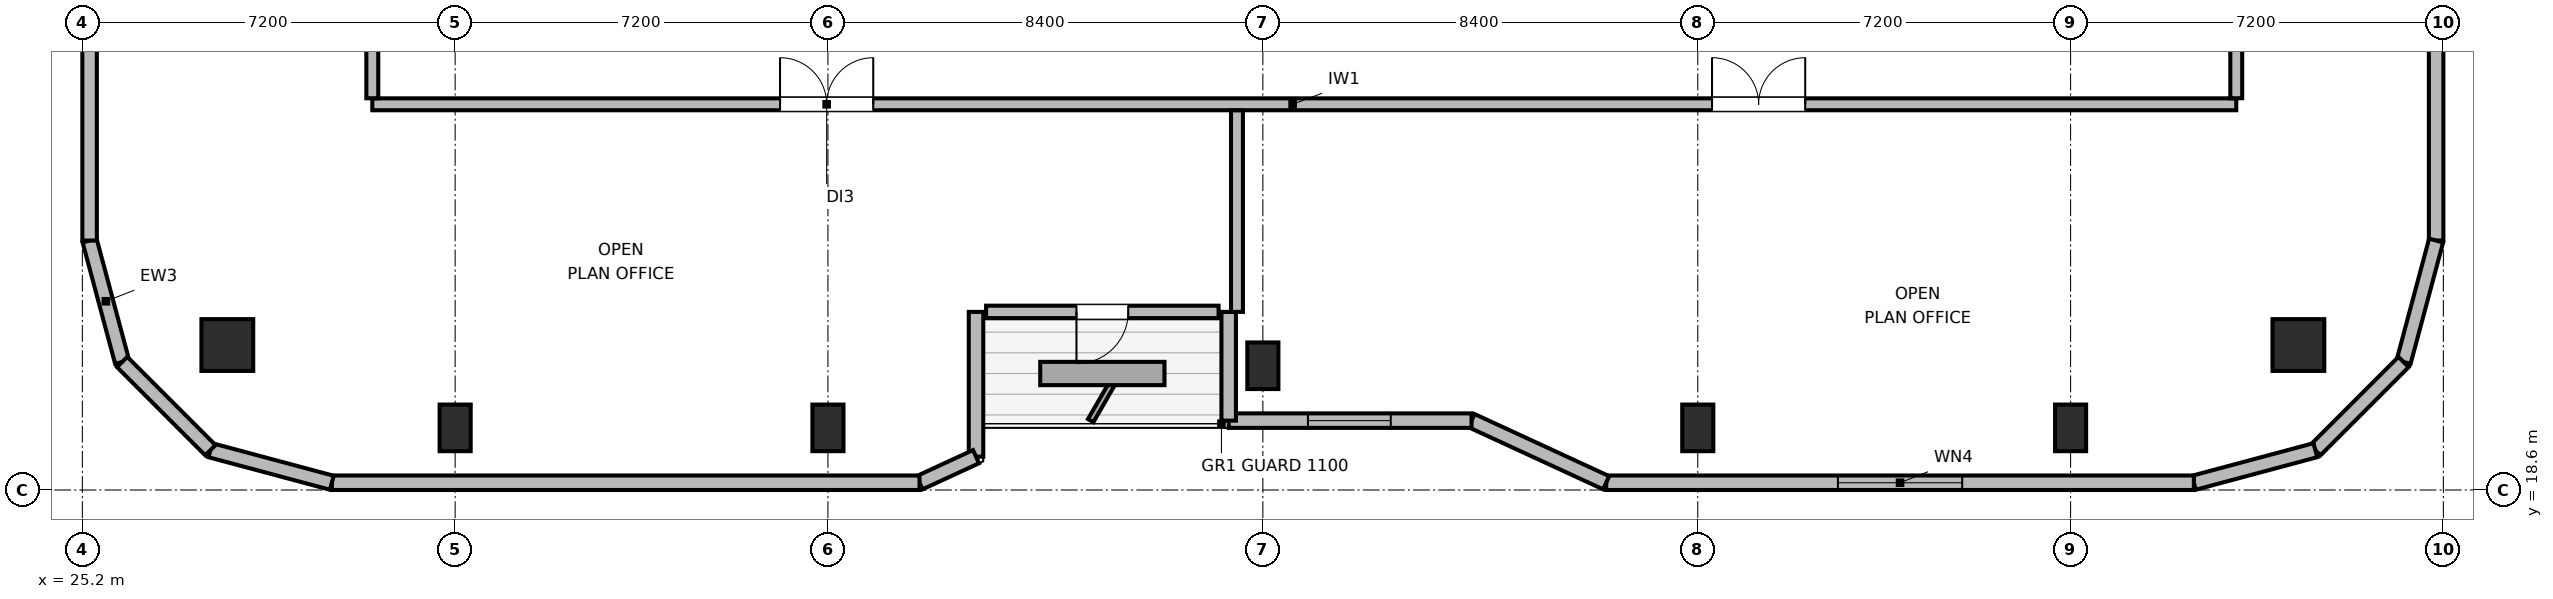
"""IFC4 building model, lengths in metres.
Left out: names, types, materials, properties, quantities, classifications, styles, units other than length and angle.
Written with IfcOpenShell. Run it as: python <this file> out.ifc"""

import sys

from ifc_helpers import new_model, si_unit, direction, frame, frame_2d, origin, origin_2d, place, context, subcontext, project, spatial, rectangle, circle, extrude, element, fill, save


model = new_model("IFC4")
c1 = context("Model", 3, precision=1e-05, world=origin(), true_north=direction((0.0, 1.0)))
c2 = subcontext(c1, "Body", "Model", "MODEL_VIEW")
j1 = project(units=[si_unit("LENGTHUNIT", "METRE"), si_unit("PLANEANGLEUNIT", "RADIAN")], contexts=[c1])
p1 = place(None, origin())
s1 = spatial("IfcSite", under=j1, at=p1, CompositionType="ELEMENT")
p2 = place(p1, origin())
s2 = spatial("IfcBuilding", under=s1, at=p2, CompositionType="ELEMENT")
p3 = place(p2, frame((0.0, 0.0, 255.0)))
s3 = spatial("IfcBuildingStorey", under=s2, at=p3, CompositionType="ELEMENT", Elevation=255.0)
for number, where, z_axis, x_axis in (
    (1, (28.0, 21.4, 0.0), (0.0, 0.0, 1.0), (1.0, 0.0, 0.0)),
    (2, (68.0, 21.4, 0.0), (0.0, 0.0, 1.0), (1.0, 0.0, 0.0)),
):
    element("IfcColumn", number, at=place(p3, frame(where, z_axis=z_axis, x_axis=x_axis)), inside=s3, PredefinedType="COLUMN", context=c2, shape_type="SweptSolid", body=[
        extrude(circle(Radius=0.5, at=origin_2d()), origin(), (0.0, 0.0, 1.0), 3.9),
    ])
for number, where, z_axis, x_axis in (
    (3, (32.4, 19.8, 0.0), (0.0, 0.0, 1.0), (1.0, 0.0, 0.0)),
    (4, (39.6, 19.8, 0.0), (0.0, 0.0, 1.0), (1.0, 0.0, 0.0)),
    (5, (48.0, 21.0, 0.0), (0.0, 0.0, 1.0), (1.0, 0.0, 0.0)),
    (6, (56.4, 19.8, 0.0), (0.0, 0.0, 1.0), (1.0, 0.0, 0.0)),
    (7, (63.6, 19.8, 0.0), (0.0, 0.0, 1.0), (1.0, 0.0, 0.0)),
):
    element("IfcColumn", number, at=place(p3, frame(where, z_axis=z_axis, x_axis=x_axis)), inside=s3, PredefinedType="COLUMN", context=c2, shape_type="SweptSolid", body=[
        extrude(rectangle(XDim=0.6, YDim=0.9, at=origin_2d()), origin(), (0.0, 0.0, 1.0), 3.9),
    ])
p4 = place(p3, frame((25.969, 21.073, 0.0), z_axis=(0.0, 0.0, 1.0), x_axis=(-0.258751159445, 0.965944013639, 0.0)))
e8 = element("IfcWall", 8, at=p4, inside=s3, PredefinedType="SOLIDWALL", context=c2, shape_type="SweptSolid", body=[
    extrude(rectangle(XDim=2.429, YDim=0.28, at=frame_2d((1.214, 0.0))), origin(), (0.0, 0.0, 1.0), 3.68),
])
p5 = place(p3, frame((25.34, 23.418, 0.0), z_axis=(0.0, 0.0, 1.0), x_axis=(0.0, 1.0, 0.0)))
e9 = element("IfcWall", 9, at=p5, inside=s3, PredefinedType="SOLIDWALL", context=c2, shape_type="SweptSolid", body=[
    extrude(rectangle(XDim=5.842, YDim=0.28, at=frame_2d((2.921, 0.0))), origin(), (0.0, 0.0, 1.0), 3.68),
])
p6 = place(p3, frame((70.66, 37.66, 0.0), z_axis=(0.0, 0.0, 1.0), x_axis=(0.0, -1.0, 0.0)))
e10 = element("IfcWall", 10, at=p6, inside=s3, PredefinedType="SOLIDWALL", context=c2, shape_type="SweptSolid", body=[
    extrude(rectangle(XDim=14.241, YDim=0.28, at=frame_2d((7.121, 0.0))), origin(), (0.0, 0.0, 1.0), 3.68),
])
p7 = place(p6, frame((6.456, 0.0, 0.85)))
e11 = element("IfcOpeningElement", 11, at=p7, cuts=e10, PredefinedType="OPENING", context=c2, shape_type="SweptSolid", body=[
    extrude(rectangle(XDim=1.6, YDim=1.0, at=frame_2d((0.8, 0.5))), frame((0.0, 0.15, 0.0), z_axis=(0.0, -1.0, 0.0), x_axis=(1.0, 0.0, 0.0)), (0.0, 0.0, 1.0), 0.3),
])
p8 = place(p3, frame((70.66, 23.418, 0.0), z_axis=(0.0, 0.0, 1.0), x_axis=(-0.258751159445, -0.965944013639, 0.0)))
e12 = element("IfcWall", 12, at=p8, inside=s3, PredefinedType="SOLIDWALL", context=c2, shape_type="SweptSolid", body=[
    extrude(rectangle(XDim=2.429, YDim=0.28, at=frame_2d((1.214, 0.0))), origin(), (0.0, 0.0, 1.0), 3.68),
])
p9 = place(p3, frame((70.031, 21.073, 0.0), z_axis=(0.0, 0.0, 1.0), x_axis=(-0.707106781187, -0.707106781187, 0.0)))
e13 = element("IfcWall", 13, at=p9, inside=s3, PredefinedType="SOLIDWALL", context=c2, shape_type="SweptSolid", body=[
    extrude(rectangle(XDim=2.41, YDim=0.28, at=frame_2d((1.205, 0.0))), origin(), (0.0, 0.0, 1.0), 3.68),
])
p10 = place(p3, frame((68.327, 19.368, 0.0), z_axis=(0.0, 0.0, 1.0), x_axis=(-0.965937282298, -0.25877628691, 0.0)))
e14 = element("IfcWall", 14, at=p10, inside=s3, PredefinedType="SOLIDWALL", context=c2, shape_type="SweptSolid", body=[
    extrude(rectangle(XDim=2.428, YDim=0.28, at=frame_2d((1.214, 0.0))), origin(), (0.0, 0.0, 1.0), 3.68),
])
p11 = place(p3, frame((65.982, 18.74, 0.0), z_axis=(0.0, 0.0, 1.0), x_axis=(-1.0, 0.0, 0.0)))
e15 = element("IfcWall", 15, at=p11, inside=s3, PredefinedType="SOLIDWALL", context=c2, shape_type="SweptSolid", body=[
    extrude(rectangle(XDim=11.351, YDim=0.28, at=frame_2d((5.676, 0.0))), origin(), (0.0, 0.0, 1.0), 3.68),
])
p12 = place(p11, frame((4.475, 0.0, 0.85)))
e16 = element("IfcOpeningElement", 16, at=p12, cuts=e15, PredefinedType="OPENING", context=c2, shape_type="SweptSolid", body=[
    extrude(rectangle(XDim=2.4, YDim=1.15, at=frame_2d((1.2, 0.575))), frame((0.0, 0.15, 0.0), z_axis=(0.0, -1.0, 0.0), x_axis=(1.0, 0.0, 0.0)), (0.0, 0.0, 1.0), 0.3),
])
p13 = place(p3, frame((54.631, 18.74, 0.0), z_axis=(0.0, 0.0, 1.0), x_axis=(-0.907956889006, 0.419063584324, 0.0)))
e17 = element("IfcWall", 17, at=p13, inside=s3, PredefinedType="SOLIDWALL", context=c2, shape_type="SweptSolid", body=[
    extrude(rectangle(XDim=2.864, YDim=0.28, at=frame_2d((1.432, 0.0))), origin(), (0.0, 0.0, 1.0), 2.265),
])
p14 = place(p3, frame((52.031, 19.94, 0.0), z_axis=(0.0, 0.0, 1.0), x_axis=(-1.0, 0.0, 0.0)))
e18 = element("IfcWall", 18, at=p14, inside=s3, PredefinedType="SOLIDWALL", context=c2, shape_type="SweptSolid", body=[
    extrude(rectangle(XDim=4.691, YDim=0.28, at=frame_2d((2.345, 0.0))), origin(), (0.0, 0.0, 1.0), 2.265),
])
p15 = place(p14, frame((1.56, 0.0, 0.85)))
e19 = element("IfcOpeningElement", 19, at=p15, cuts=e18, PredefinedType="OPENING", context=c2, shape_type="SweptSolid", body=[
    extrude(rectangle(XDim=1.6, YDim=1.0, at=frame_2d((0.8, 0.5))), frame((0.0, 0.15, 0.0), z_axis=(0.0, -1.0, 0.0), x_axis=(1.0, 0.0, 0.0)), (0.0, 0.0, 1.0), 0.3),
])
p16 = place(p3, frame((47.34, 19.94, 0.0), z_axis=(0.0, 0.0, 1.0), x_axis=(0.0, 1.0, 0.0)))
e20 = element("IfcWall", 20, at=p16, inside=s3, PredefinedType="SOLIDWALL", context=c2, shape_type="SweptSolid", body=[
    extrude(rectangle(XDim=2.1, YDim=0.28, at=frame_2d((1.05, 0.0))), origin(), (0.0, 0.0, 1.0), 2.265),
])
p17 = place(p3, frame((47.145, 22.04, 0.0), z_axis=(0.0, 0.0, 1.0), x_axis=(-1.0, 0.0, 0.0)))
e21 = element("IfcWall", 21, at=p17, inside=s3, PredefinedType="SOLIDWALL", context=c2, shape_type="SweptSolid", body=[
    extrude(rectangle(XDim=4.49, YDim=0.24, at=frame_2d((2.245, 0.0))), origin(), (0.0, 0.0, 1.0), 3.68),
])
p18 = place(p17, frame((1.745, 0.0, 0.0)))
e22 = element("IfcOpeningElement", 22, at=p18, cuts=e21, PredefinedType="OPENING", context=c2, shape_type="SweptSolid", body=[
    extrude(rectangle(XDim=1.0, YDim=2.02, at=frame_2d((0.5, 1.01))), frame((0.0, 0.13, 0.0), z_axis=(0.0, -1.0, 0.0), x_axis=(1.0, 0.0, 0.0)), (0.0, 0.0, 1.0), 0.26),
])
p19 = place(p3, frame((42.46, 22.04, 0.0), z_axis=(0.0, 0.0, 1.0), x_axis=(0.0, -1.0, 0.0)))
e23 = element("IfcWall", 23, at=p19, inside=s3, PredefinedType="SOLIDWALL", context=c2, shape_type="SweptSolid", body=[
    extrude(rectangle(XDim=2.796, YDim=0.28, at=frame_2d((1.398, 0.0))), origin(), (0.0, 0.0, 1.0), 2.265),
])
p20 = place(p3, frame((42.46, 19.244, 0.0), z_axis=(0.0, 0.0, 1.0), x_axis=(-0.907893953211, -0.419199916176, 0.0)))
e24 = element("IfcWall", 24, at=p20, inside=s3, PredefinedType="SOLIDWALL", context=c2, shape_type="SweptSolid", body=[
    extrude(rectangle(XDim=1.201, YDim=0.28, at=frame_2d((0.601, 0.0))), origin(), (0.0, 0.0, 1.0), 3.68),
])
p21 = place(p3, frame((41.369, 18.74, 0.0), z_axis=(0.0, 0.0, 1.0), x_axis=(-1.0, 0.0, 0.0)))
e25 = element("IfcWall", 25, at=p21, inside=s3, PredefinedType="SOLIDWALL", context=c2, shape_type="SweptSolid", body=[
    extrude(rectangle(XDim=11.351, YDim=0.28, at=frame_2d((5.675, 0.0))), origin(), (0.0, 0.0, 1.0), 3.68),
])
p22 = place(p3, frame((30.018, 18.74, 0.0), z_axis=(0.0, 0.0, 1.0), x_axis=(-0.965937282298, 0.25877628691, 0.0)))
e26 = element("IfcWall", 26, at=p22, inside=s3, PredefinedType="SOLIDWALL", context=c2, shape_type="SweptSolid", body=[
    extrude(rectangle(XDim=2.428, YDim=0.28, at=frame_2d((1.214, 0.0))), origin(), (0.0, 0.0, 1.0), 3.68),
])
p23 = place(p3, frame((27.673, 19.368, 0.0), z_axis=(0.0, 0.0, 1.0), x_axis=(-0.707106781187, 0.707106781187, 0.0)))
e27 = element("IfcWall", 27, at=p23, inside=s3, PredefinedType="SOLIDWALL", context=c2, shape_type="SweptSolid", body=[
    extrude(rectangle(XDim=2.41, YDim=0.28, at=frame_2d((1.205, 0.0))), origin(), (0.0, 0.0, 1.0), 3.68),
])
p24 = place(p3, frame((30.8, 26.05, 0.0), z_axis=(0.0, 0.0, 1.0), x_axis=(1.0, 0.0, 0.0)))
e28 = element("IfcWall", 28, at=p24, inside=s3, PredefinedType="PARTITIONING", context=c2, shape_type="SweptSolid", body=[
    extrude(rectangle(XDim=36.0, YDim=0.23, at=frame_2d((18.0, 0.0))), origin(), (0.0, 0.0, 1.0), 3.68),
])
p25 = place(p24, frame((7.875, 0.0, 0.0)))
e29 = element("IfcOpeningElement", 29, at=p25, cuts=e28, PredefinedType="OPENING", context=c2, shape_type="SweptSolid", body=[
    extrude(rectangle(XDim=1.8, YDim=2.06, at=frame_2d((0.9, 1.03))), frame((0.0, 0.125, 0.0), z_axis=(0.0, -1.0, 0.0), x_axis=(1.0, 0.0, 0.0)), (0.0, 0.0, 1.0), 0.25),
])
p26 = place(p24, frame((25.875, 0.0, 0.0)))
e30 = element("IfcOpeningElement", 30, at=p26, cuts=e28, PredefinedType="OPENING", context=c2, shape_type="SweptSolid", body=[
    extrude(rectangle(XDim=1.8, YDim=2.06, at=frame_2d((0.9, 1.03))), frame((0.0, 0.125, 0.0), z_axis=(0.0, -1.0, 0.0), x_axis=(1.0, 0.0, 0.0)), (0.0, 0.0, 1.0), 0.25),
])
p27 = place(p3, frame((30.8, 26.167, 0.0), z_axis=(0.0, 0.0, 1.0), x_axis=(0.0, 1.0, 0.0)))
e31 = element("IfcWall", 31, at=p27, inside=s3, PredefinedType="PARTITIONING", context=c2, shape_type="SweptSolid", body=[
    extrude(rectangle(XDim=19.666, YDim=0.23, at=frame_2d((9.833, 0.0))), origin(), (0.0, 0.0, 1.0), 3.68),
])
p28 = place(p27, frame((9.358, 0.0, 0.0)))
e32 = element("IfcOpeningElement", 32, at=p28, cuts=e31, PredefinedType="OPENING", context=c2, shape_type="SweptSolid", body=[
    extrude(rectangle(XDim=1.8, YDim=2.06, at=frame_2d((0.9, 1.03))), frame((0.0, 0.125, 0.0), z_axis=(0.0, -1.0, 0.0), x_axis=(1.0, 0.0, 0.0)), (0.0, 0.0, 1.0), 0.25),
])
p29 = place(p3, frame((66.8, 26.167, 0.0), z_axis=(0.0, 0.0, 1.0), x_axis=(0.0, 1.0, 0.0)))
e33 = element("IfcWall", 33, at=p29, inside=s3, PredefinedType="PARTITIONING", context=c2, shape_type="SweptSolid", body=[
    extrude(rectangle(XDim=19.666, YDim=0.23, at=frame_2d((9.833, 0.0))), origin(), (0.0, 0.0, 1.0), 3.68),
])
p30 = place(p29, frame((4.983, 0.0, 0.0)))
e34 = element("IfcOpeningElement", 34, at=p30, cuts=e33, PredefinedType="OPENING", context=c2, shape_type="SweptSolid", body=[
    extrude(rectangle(XDim=1.8, YDim=2.06, at=frame_2d((0.9, 1.03))), frame((0.0, 0.125, 0.0), z_axis=(0.0, -1.0, 0.0), x_axis=(1.0, 0.0, 0.0)), (0.0, 0.0, 1.0), 0.25),
])
p31 = place(p29, frame((14.933, 0.0, 0.0)))
e35 = element("IfcOpeningElement", 35, at=p31, cuts=e33, PredefinedType="OPENING", context=c2, shape_type="SweptSolid", body=[
    extrude(rectangle(XDim=1.8, YDim=2.06, at=frame_2d((0.9, 1.03))), frame((0.0, 0.125, 0.0), z_axis=(0.0, -1.0, 0.0), x_axis=(1.0, 0.0, 0.0)), (0.0, 0.0, 1.0), 0.25),
])
p32 = place(p3, frame((47.5, 22.04, 0.0), z_axis=(0.0, 0.0, 1.0), x_axis=(0.0, 1.0, 0.0)))
e36 = element("IfcWall", 36, at=p32, inside=s3, PredefinedType="PARTITIONING", context=c2, shape_type="SweptSolid", body=[
    extrude(rectangle(XDim=3.893, YDim=0.23, at=frame_2d((1.947, 0.0))), origin(), (0.0, 0.0, 1.0), 3.68),
])
p33 = place(p12, origin())
e37 = element("IfcWindow", 37, at=p33, inside=s3, PartitioningType="SINGLE_PANEL", PredefinedType="WINDOW", context=c2, shape_type="SweptSolid", body=[
    extrude(rectangle(XDim=2.4, YDim=1.15, at=frame_2d((1.2, 0.575))), frame((0.0, 0.03, 0.0), z_axis=(0.0, -1.0, 0.0), x_axis=(1.0, 0.0, 0.0)), (0.0, 0.0, 1.0), 0.06),
])
fill(e16, e37)
p34 = place(p15, origin())
e38 = element("IfcWindow", 38, at=p34, inside=s3, PartitioningType="SINGLE_PANEL", PredefinedType="WINDOW", context=c2, shape_type="SweptSolid", body=[
    extrude(rectangle(XDim=1.6, YDim=1.0, at=frame_2d((0.8, 0.5))), frame((0.0, 0.03, 0.0), z_axis=(0.0, -1.0, 0.0), x_axis=(1.0, 0.0, 0.0)), (0.0, 0.0, 1.0), 0.06),
])
fill(e19, e38)
p35 = place(p18, origin())
e39 = element("IfcDoor", 39, at=p35, inside=s3, OperationType="SINGLE_SWING_RIGHT", PredefinedType="DOOR", context=c2, shape_type="SweptSolid", body=[
    extrude(rectangle(XDim=1.0, YDim=2.02, at=frame_2d((0.5, 1.01))), frame((0.0, 0.025, 0.0), z_axis=(0.0, -1.0, 0.0), x_axis=(1.0, 0.0, 0.0)), (0.0, 0.0, 1.0), 0.05),
])
fill(e22, e39)
p36 = place(p25, origin())
e40 = element("IfcDoor", 40, at=p36, inside=s3, OperationType="DOUBLE_DOOR_SINGLE_SWING", PredefinedType="DOOR", context=c2, shape_type="SweptSolid", body=[
    extrude(rectangle(XDim=1.8, YDim=2.06, at=frame_2d((0.9, 1.03))), frame((0.0, 0.025, 0.0), z_axis=(0.0, -1.0, 0.0), x_axis=(1.0, 0.0, 0.0)), (0.0, 0.0, 1.0), 0.05),
])
fill(e29, e40)
p37 = place(p26, origin())
e41 = element("IfcDoor", 41, at=p37, inside=s3, OperationType="DOUBLE_DOOR_SINGLE_SWING", PredefinedType="DOOR", context=c2, shape_type="SweptSolid", body=[
    extrude(rectangle(XDim=1.8, YDim=2.06, at=frame_2d((0.9, 1.03))), frame((0.0, 0.025, 0.0), z_axis=(0.0, -1.0, 0.0), x_axis=(1.0, 0.0, 0.0)), (0.0, 0.0, 1.0), 0.05),
])
fill(e30, e41)
save(model, sys.argv[1])
